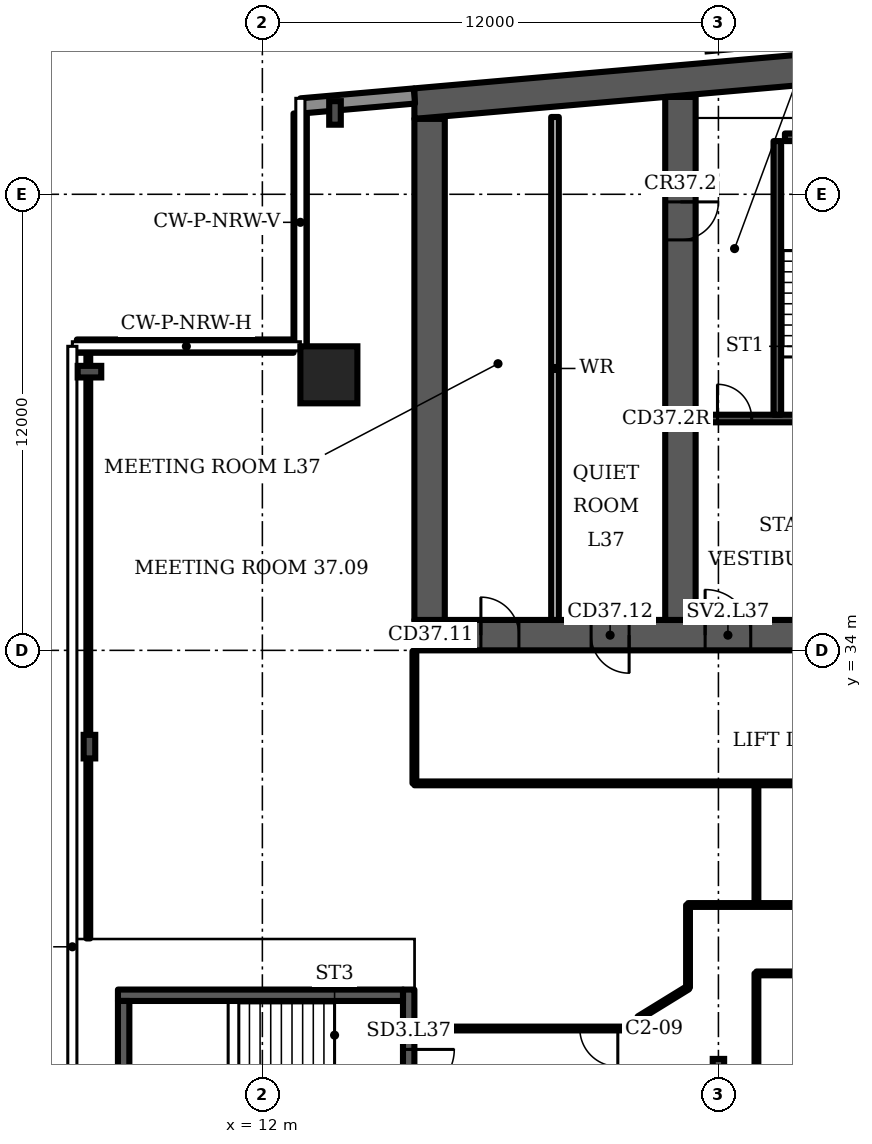
"""IFC4 building model, lengths in metres.
Left out: names, types, materials, properties, quantities, classifications, styles, units other than length and angle.
Written with IfcOpenShell. Run it as: python <this file> out.ifc"""

import sys

from ifc_helpers import new_model, si_unit, direction, frame, frame_2d, origin, origin_2d, place, context, subcontext, project, spatial, polyline, rectangle, i_section, outline, extrude, element, fill, save


model = new_model("IFC4")
c1 = context("Model", 3, precision=1e-05, world=origin(), true_north=direction((0.0, 1.0)))
c2 = subcontext(c1, "Body", "Model", "MODEL_VIEW")
j1 = project(units=[si_unit("LENGTHUNIT", "METRE"), si_unit("PLANEANGLEUNIT", "RADIAN")], contexts=[c1])
p1 = place(None, origin())
s1 = spatial("IfcSite", under=j1, at=p1, CompositionType="ELEMENT")
p2 = place(p1, origin())
s2 = spatial("IfcBuilding", under=s1, at=p2, CompositionType="ELEMENT")
p3 = place(p2, frame((0.0, 0.0, 155.5)))
s3 = spatial("IfcBuildingStorey", under=s2, at=p3, CompositionType="ELEMENT", Elevation=155.5)
p4 = place(p3, origin())
e1 = element("IfcWall", 1, at=p4, inside=s3, PredefinedType="SHEAR", context=c2, shape_type="SweptSolid", body=[
    extrude(outline(polyline([(16.0, 47.984), (37.0, 49.822), (58.0, 47.984), (58.0, 48.787), (37.0, 50.625), (16.0, 48.787), (16.0, 47.984)])), origin(), (0.0, 0.0, 1.0), 3.6),
])
p5 = place(p3, frame((16.0, 34.4, 0.0), z_axis=(0.0, 0.0, 1.0), x_axis=(1.0, 0.0, 0.0)))
e2 = element("IfcWall", 2, at=p5, inside=s3, PredefinedType="SHEAR", context=c2, shape_type="SweptSolid", body=[
    extrude(rectangle(XDim=42.0, YDim=0.8, at=frame_2d((21.0, 0.0))), origin(), (0.0, 0.0, 1.0), 3.6),
])
p6 = place(p5, frame((1.75, 0.0, 0.0)))
e3 = element("IfcOpeningElement", 3, at=p6, cuts=e2, PredefinedType="OPENING", context=c2, shape_type="SweptSolid", body=[
    extrude(rectangle(XDim=1.0, YDim=2.1, at=frame_2d((0.5, 1.05))), frame((0.0, 0.41, 0.0), z_axis=(0.0, -1.0, 0.0), x_axis=(1.0, 0.0, 0.0)), (0.0, 0.0, 1.0), 0.82),
])
p7 = place(p5, frame((4.65, 0.0, 0.0)))
e4 = element("IfcOpeningElement", 4, at=p7, cuts=e2, PredefinedType="OPENING", context=c2, shape_type="SweptSolid", body=[
    extrude(rectangle(XDim=1.0, YDim=2.1, at=frame_2d((0.5, 1.05))), frame((0.0, 0.41, 0.0), z_axis=(0.0, -1.0, 0.0), x_axis=(1.0, 0.0, 0.0)), (0.0, 0.0, 1.0), 0.82),
])
p8 = place(p5, frame((7.65, 0.0, 0.0)))
e5 = element("IfcOpeningElement", 5, at=p8, cuts=e2, PredefinedType="OPENING", context=c2, shape_type="SweptSolid", body=[
    extrude(rectangle(XDim=1.2, YDim=2.1, at=frame_2d((0.6, 1.05))), frame((0.0, 0.41, 0.0), z_axis=(0.0, -1.0, 0.0), x_axis=(1.0, 0.0, 0.0)), (0.0, 0.0, 1.0), 0.82),
])
p9 = place(p5, frame((14.767, 0.0, 0.0)))
e6 = element("IfcOpeningElement", 6, at=p9, cuts=e2, PredefinedType="OPENING", context=c2, shape_type="SweptSolid", body=[
    extrude(rectangle(XDim=1.1, YDim=2.1, at=frame_2d((0.55, 1.05))), frame((0.0, 0.41, 0.0), z_axis=(0.0, -1.0, 0.0), x_axis=(1.0, 0.0, 0.0)), (0.0, 0.0, 1.0), 0.82),
])
p10 = place(p5, frame((19.133, 0.0, 0.0)))
e7 = element("IfcOpeningElement", 7, at=p10, cuts=e2, PredefinedType="OPENING", context=c2, shape_type="SweptSolid", body=[
    extrude(rectangle(XDim=1.1, YDim=2.1, at=frame_2d((0.55, 1.05))), frame((0.0, 0.41, 0.0), z_axis=(0.0, -1.0, 0.0), x_axis=(1.0, 0.0, 0.0)), (0.0, 0.0, 1.0), 0.82),
])
p11 = place(p5, frame((16.8, 0.0, 0.0)))
e8 = element("IfcOpeningElement", 8, at=p11, cuts=e2, PredefinedType="OPENING", context=c2, shape_type="SweptSolid", body=[
    extrude(rectangle(XDim=1.4, YDim=2.1, at=frame_2d((0.7, 1.05))), frame((0.0, 0.41, 0.0), z_axis=(0.0, -1.0, 0.0), x_axis=(1.0, 0.0, 0.0)), (0.0, 0.0, 1.0), 0.82),
])
p12 = place(p5, frame((21.767, 0.0, 0.0)))
e9 = element("IfcOpeningElement", 9, at=p12, cuts=e2, PredefinedType="OPENING", context=c2, shape_type="SweptSolid", body=[
    extrude(rectangle(XDim=1.1, YDim=2.1, at=frame_2d((0.55, 1.05))), frame((0.0, 0.41, 0.0), z_axis=(0.0, -1.0, 0.0), x_axis=(1.0, 0.0, 0.0)), (0.0, 0.0, 1.0), 0.82),
])
p13 = place(p5, frame((23.95, 0.0, 0.0)))
e10 = element("IfcOpeningElement", 10, at=p13, cuts=e2, PredefinedType="OPENING", context=c2, shape_type="SweptSolid", body=[
    extrude(rectangle(XDim=1.1, YDim=2.1, at=frame_2d((0.55, 1.05))), frame((0.0, 0.41, 0.0), z_axis=(0.0, -1.0, 0.0), x_axis=(1.0, 0.0, 0.0)), (0.0, 0.0, 1.0), 0.82),
])
p14 = place(p5, frame((26.133, 0.0, 0.0)))
e11 = element("IfcOpeningElement", 11, at=p14, cuts=e2, PredefinedType="OPENING", context=c2, shape_type="SweptSolid", body=[
    extrude(rectangle(XDim=1.1, YDim=2.1, at=frame_2d((0.55, 1.05))), frame((0.0, 0.41, 0.0), z_axis=(0.0, -1.0, 0.0), x_axis=(1.0, 0.0, 0.0)), (0.0, 0.0, 1.0), 0.82),
])
p15 = place(p5, frame((33.15, 0.0, 0.0)))
e12 = element("IfcOpeningElement", 12, at=p15, cuts=e2, PredefinedType="OPENING", context=c2, shape_type="SweptSolid", body=[
    extrude(rectangle(XDim=1.2, YDim=2.1, at=frame_2d((0.6, 1.05))), frame((0.0, 0.41, 0.0), z_axis=(0.0, -1.0, 0.0), x_axis=(1.0, 0.0, 0.0)), (0.0, 0.0, 1.0), 0.82),
])
p16 = place(p5, frame((35.817, 0.0, 0.0)))
e13 = element("IfcOpeningElement", 13, at=p16, cuts=e2, PredefinedType="OPENING", context=c2, shape_type="SweptSolid", body=[
    extrude(rectangle(XDim=1.0, YDim=2.1, at=frame_2d((0.5, 1.05))), frame((0.0, 0.41, 0.0), z_axis=(0.0, -1.0, 0.0), x_axis=(1.0, 0.0, 0.0)), (0.0, 0.0, 1.0), 0.82),
])
p17 = place(p5, frame((39.95, 0.0, 0.0)))
e14 = element("IfcOpeningElement", 14, at=p17, cuts=e2, PredefinedType="OPENING", context=c2, shape_type="SweptSolid", body=[
    extrude(rectangle(XDim=1.0, YDim=2.1, at=frame_2d((0.5, 1.05))), frame((0.0, 0.41, 0.0), z_axis=(0.0, -1.0, 0.0), x_axis=(1.0, 0.0, 0.0)), (0.0, 0.0, 1.0), 0.82),
])
p18 = place(p5, frame((37.767, 0.0, 0.0)))
e15 = element("IfcOpeningElement", 15, at=p18, cuts=e2, PredefinedType="OPENING", context=c2, shape_type="SweptSolid", body=[
    extrude(rectangle(XDim=1.4, YDim=2.1, at=frame_2d((0.7, 1.05))), frame((0.0, 0.41, 0.0), z_axis=(0.0, -1.0, 0.0), x_axis=(1.0, 0.0, 0.0)), (0.0, 0.0, 1.0), 0.82),
])
p19 = place(p3, frame((16.4, 34.8, 0.0), z_axis=(0.0, 0.0, 1.0), x_axis=(0.0, 1.0, 0.0)))
e16 = element("IfcWall", 16, at=p19, inside=s3, PredefinedType="SHEAR", context=c2, shape_type="SweptSolid", body=[
    extrude(rectangle(XDim=13.184, YDim=0.8, at=frame_2d((6.592, 0.0))), origin(), (0.0, 0.0, 1.0), 3.6),
])
p20 = place(p3, frame((23.0, 34.8, 0.0), z_axis=(0.0, 0.0, 1.0), x_axis=(0.0, 1.0, 0.0)))
e17 = element("IfcWall", 17, at=p20, inside=s3, PredefinedType="SHEAR", context=c2, shape_type="SweptSolid", body=[
    extrude(rectangle(XDim=13.762, YDim=0.8, at=frame_2d((6.881, 0.0))), origin(), (0.0, 0.0, 1.0), 3.6),
])
p21 = place(p20, frame((10.0, 0.0, 0.0)))
e18 = element("IfcOpeningElement", 18, at=p21, cuts=e17, PredefinedType="OPENING", context=c2, shape_type="SweptSolid", body=[
    extrude(rectangle(XDim=1.0, YDim=2.1, at=frame_2d((0.5, 1.05))), frame((0.0, 0.41, 0.0), z_axis=(0.0, -1.0, 0.0), x_axis=(1.0, 0.0, 0.0)), (0.0, 0.0, 1.0), 0.82),
])
p22 = place(p3, frame((13.75, 41.25, 0.0), z_axis=(0.0, 0.0, 1.0), x_axis=(1.0, 0.0, 0.0)))
e19 = element("IfcColumn", 19, at=p22, inside=s3, PredefinedType="COLUMN", context=c2, shape_type="SweptSolid", body=[
    extrude(rectangle(XDim=1.5, YDim=1.5, at=origin_2d()), origin(), (0.0, 0.0, 1.0), 3.6),
])
for number, where, z_axis, x_axis in (
    (20, (13.911, 48.141, 0.0), (0.0, 0.0, 1.0), (-1.0, 0.0, 0.0)),
    (21, (7.45, 41.333, 0.0), (0.0, 0.0, 1.0), (0.0, 1.0, 0.0)),
    (22, (7.45, 31.467, 0.0), (0.0, 0.0, 1.0), (-1.0, 0.0, 0.0)),
):
    element("IfcColumn", number, at=place(p3, frame(where, z_axis=z_axis, x_axis=x_axis)), inside=s3, PredefinedType="COLUMN", context=c2, shape_type="SweptSolid", body=[
        extrude(i_section(OverallWidth=0.305, OverallDepth=0.62, WebThickness=0.021, FlangeThickness=0.04, FilletRadius=0.027, at=origin_2d()), origin(), (0.0, 0.0, 1.0), 3.6),
    ])
p23 = place(p3, frame((24.0, 23.0, 0.0), z_axis=(0.0, 0.0, 1.0), x_axis=(1.0, 0.0, 0.0)))
e23 = element("IfcColumn", 23, at=p23, inside=s3, PredefinedType="COLUMN", context=c2, shape_type="SweptSolid", body=[
    extrude(i_section(OverallWidth=0.3, OverallDepth=0.5, WebThickness=0.014, FlangeThickness=0.028, FilletRadius=0.027, at=origin_2d()), origin(), (0.0, 0.0, 1.0), 3.6),
])
p24 = place(p3, frame((16.0, 48.587, 0.0), z_axis=(0.0, 0.0, 1.0), x_axis=(-0.996194, -0.087168, 0.0)))
e24 = element("IfcWall", 24, at=p24, inside=s3, PredefinedType="SOLIDWALL", context=c2, shape_type="SweptSolid", body=[
    extrude(rectangle(XDim=2.994, YDim=0.4, at=frame_2d((1.497, 0.0))), origin(), (0.0, 0.0, 1.0), 3.2),
])
p25 = place(p3, frame((12.995, 48.126, 0.0), z_axis=(0.0, 0.0, 1.0), x_axis=(0.0, -1.0, 0.0)))
e25 = element("IfcWall", 25, at=p25, inside=s3, PredefinedType="SOLIDWALL", context=c2, shape_type="SweptSolid", body=[
    extrude(rectangle(XDim=6.126, YDim=0.35, at=frame_2d((3.063, 0.0))), origin(), (0.0, 0.0, 1.0), 1.0),
])
p26 = place(p3, frame((12.82, 42.005, 0.0), z_axis=(0.0, 0.0, 1.0), x_axis=(-1.0, 0.0, 0.0)))
e26 = element("IfcWall", 26, at=p26, inside=s3, PredefinedType="SOLIDWALL", context=c2, shape_type="SweptSolid", body=[
    extrude(rectangle(XDim=5.7, YDim=0.35, at=frame_2d((2.85, 0.0))), origin(), (0.0, 0.0, 1.0), 1.0),
])
p27 = place(p3, frame((19.7, 34.8, 0.0), z_axis=(0.0, 0.0, 1.0), x_axis=(0.0, 1.0, 0.0)))
e27 = element("IfcWall", 27, at=p27, inside=s3, PredefinedType="PARTITIONING", context=c2, shape_type="SweptSolid", body=[
    extrude(rectangle(XDim=13.234, YDim=0.2, at=frame_2d((6.617, 0.0))), origin(), (0.0, 0.0, 1.0), 3.2),
])
p28 = place(p3, frame((23.4, 40.1, 0.0), z_axis=(0.0, 0.0, 1.0), x_axis=(1.0, 0.0, 0.0)))
e28 = element("IfcWall", 28, at=p28, inside=s3, PredefinedType="SHEAR", context=c2, shape_type="SweptSolid", body=[
    extrude(rectangle(XDim=6.2, YDim=0.2, at=frame_2d((3.1, 0.0))), origin(), (0.0, 0.0, 1.0), 3.2),
])
p29 = place(p28, frame((3.525, 0.0, 0.0)))
e29 = element("IfcOpeningElement", 29, at=p29, cuts=e28, PredefinedType="OPENING", context=c2, shape_type="SweptSolid", body=[
    extrude(rectangle(XDim=1.2, YDim=2.1, at=frame_2d((0.6, 1.05))), frame((0.0, 0.11, 0.0), z_axis=(0.0, -1.0, 0.0), x_axis=(1.0, 0.0, 0.0)), (0.0, 0.0, 1.0), 0.22),
])
p30 = place(p28, frame((0.575, 0.0, 0.0)))
e30 = element("IfcOpeningElement", 30, at=p30, cuts=e28, PredefinedType="OPENING", context=c2, shape_type="SweptSolid", body=[
    extrude(rectangle(XDim=0.9, YDim=2.1, at=frame_2d((0.45, 1.05))), frame((0.0, 0.11, 0.0), z_axis=(0.0, -1.0, 0.0), x_axis=(1.0, 0.0, 0.0)), (0.0, 0.0, 1.0), 0.22),
])
p31 = place(p3, frame((25.55, 40.2, 0.0), z_axis=(0.0, 0.0, 1.0), x_axis=(0.0, 1.0, 0.0)))
e31 = element("IfcWall", 31, at=p31, inside=s3, PredefinedType="SHEAR", context=c2, shape_type="SweptSolid", body=[
    extrude(rectangle(XDim=7.2, YDim=0.2, at=frame_2d((3.6, 0.0))), origin(), (0.0, 0.0, 1.0), 3.2),
])
p32 = place(p3, frame((25.75, 47.5, 0.0), z_axis=(0.0, 0.0, 1.0), x_axis=(1.0, 0.0, 0.0)))
e32 = element("IfcWall", 32, at=p32, inside=s3, PredefinedType="SHEAR", context=c2, shape_type="SweptSolid", body=[
    extrude(rectangle(XDim=3.85, YDim=0.2, at=frame_2d((1.925, 0.0))), origin(), (0.0, 0.0, 1.0), 3.2),
])
p33 = place(p3, frame((15.85, 20.725, 0.0), z_axis=(0.0, 0.0, 1.0), x_axis=(0.0, 1.0, 0.0)))
e33 = element("IfcWall", 33, at=p33, inside=s3, PredefinedType="SHEAR", context=c2, shape_type="SweptSolid", body=[
    extrude(rectangle(XDim=4.35, YDim=0.3, at=frame_2d((2.175, 0.0))), origin(), (0.0, 0.0, 1.0), 3.2),
])
p34 = place(p33, frame((1.575, 0.0, 0.0)))
e34 = element("IfcOpeningElement", 34, at=p34, cuts=e33, PredefinedType="OPENING", context=c2, shape_type="SweptSolid", body=[
    extrude(rectangle(XDim=1.2, YDim=2.1, at=frame_2d((0.6, 1.05))), frame((0.0, 0.16, 0.0), z_axis=(0.0, -1.0, 0.0), x_axis=(1.0, 0.0, 0.0)), (0.0, 0.0, 1.0), 0.32),
])
p35 = place(p3, frame((7.42, 26.42, 0.0), z_axis=(0.0, 0.0, 1.0), x_axis=(0.0, 1.0, 0.0)))
e35 = element("IfcWall", 35, at=p35, inside=s3, PredefinedType="PARTITIONING", context=c2, shape_type="SweptSolid", body=[
    extrude(rectangle(XDim=15.56, YDim=0.1, at=frame_2d((7.78, 0.0))), origin(), (0.0, 0.0, 1.0), 2.58),
])
p36 = place(p3, frame((16.0, 30.5, 0.0), z_axis=(0.0, 0.0, 1.0), x_axis=(0.0, 1.0, 0.0)))
e36 = element("IfcWall", 36, at=p36, inside=s3, PredefinedType="PARTITIONING", context=c2, shape_type="SweptSolid", body=[
    extrude(rectangle(XDim=3.48, YDim=0.1, at=frame_2d((1.74, 0.0))), origin(), (0.0, 0.0, 1.0), 3.2),
])
p37 = place(p3, frame((16.0, 30.5, 0.0), z_axis=(0.0, 0.0, 1.0), x_axis=(1.0, 0.0, 0.0)))
e37 = element("IfcWall", 37, at=p37, inside=s3, PredefinedType="PARTITIONING", context=c2, shape_type="SweptSolid", body=[
    extrude(rectangle(XDim=20.85, YDim=0.1, at=frame_2d((10.425, 0.0))), origin(), (0.0, 0.0, 1.0), 3.2),
])
p38 = place(p37, frame((14.42, 0.0, 0.0)))
e38 = element("IfcOpeningElement", 38, at=p38, cuts=e37, PredefinedType="OPENING", context=c2, shape_type="SweptSolid", body=[
    extrude(rectangle(XDim=1.0, YDim=2.1, at=frame_2d((0.5, 1.05))), frame((0.0, 0.06, 0.0), z_axis=(0.0, -1.0, 0.0), x_axis=(1.0, 0.0, 0.0)), (0.0, 0.0, 1.0), 0.12),
])
p39 = place(p3, frame((16.02, 24.05, 0.0), z_axis=(0.0, 0.0, 1.0), x_axis=(1.0, 0.0, 0.0)))
e39 = element("IfcWall", 39, at=p39, inside=s3, PredefinedType="PARTITIONING", context=c2, shape_type="SweptSolid", body=[
    extrude(rectangle(XDim=5.855, YDim=0.1, at=frame_2d((2.927, 0.0))), origin(), (0.0, 0.0, 1.0), 3.2),
])
p40 = place(p39, frame((4.333, 0.0, 0.0)))
e40 = element("IfcOpeningElement", 40, at=p40, cuts=e39, PredefinedType="OPENING", context=c2, shape_type="SweptSolid", body=[
    extrude(rectangle(XDim=1.0, YDim=2.1, at=frame_2d((0.5, 1.05))), frame((0.0, 0.06, 0.0), z_axis=(0.0, -1.0, 0.0), x_axis=(1.0, 0.0, 0.0)), (0.0, 0.0, 1.0), 0.12),
])
p41 = place(p3, frame((21.9, 24.325, 0.0), z_axis=(0.0, 0.0, 1.0), x_axis=(0.851649, 0.524104, 0.0)))
e41 = element("IfcWall", 41, at=p41, inside=s3, PredefinedType="PARTITIONING", context=c2, shape_type="SweptSolid", body=[
    extrude(rectangle(XDim=1.527, YDim=0.1, at=frame_2d((0.763, 0.0))), origin(), (0.0, 0.0, 1.0), 3.2),
])
p42 = place(p3, frame((23.2, 25.125, 0.0), z_axis=(0.0, 0.0, 1.0), x_axis=(0.0, 1.0, 0.0)))
e42 = element("IfcWall", 42, at=p42, inside=s3, PredefinedType="PARTITIONING", context=c2, shape_type="SweptSolid", body=[
    extrude(rectangle(XDim=2.175, YDim=0.1, at=frame_2d((1.087, 0.0))), origin(), (0.0, 0.0, 1.0), 3.2),
])
p43 = place(p3, frame((23.2, 27.3, 0.0), z_axis=(0.0, 0.0, 1.0), x_axis=(1.0, 0.0, 0.0)))
e43 = element("IfcWall", 43, at=p43, inside=s3, PredefinedType="PARTITIONING", context=c2, shape_type="SweptSolid", body=[
    extrude(rectangle(XDim=33.9, YDim=0.1, at=frame_2d((16.95, 0.0))), origin(), (0.0, 0.0, 1.0), 3.2),
])
p44 = place(p43, frame((16.3, 0.0, 0.0)))
e44 = element("IfcOpeningElement", 44, at=p44, cuts=e43, PredefinedType="OPENING", context=c2, shape_type="SweptSolid", body=[
    extrude(rectangle(XDim=1.0, YDim=2.1, at=frame_2d((0.5, 1.05))), frame((0.0, 0.06, 0.0), z_axis=(0.0, -1.0, 0.0), x_axis=(1.0, 0.0, 0.0)), (0.0, 0.0, 1.0), 0.12),
])
p45 = place(p43, frame((20.72, 0.0, 0.0)))
e45 = element("IfcOpeningElement", 45, at=p45, cuts=e43, PredefinedType="OPENING", context=c2, shape_type="SweptSolid", body=[
    extrude(rectangle(XDim=1.0, YDim=2.1, at=frame_2d((0.5, 1.05))), frame((0.0, 0.06, 0.0), z_axis=(0.0, -1.0, 0.0), x_axis=(1.0, 0.0, 0.0)), (0.0, 0.0, 1.0), 0.12),
])
p46 = place(p43, frame((23.54, 0.0, 0.0)))
e46 = element("IfcOpeningElement", 46, at=p46, cuts=e43, PredefinedType="OPENING", context=c2, shape_type="SweptSolid", body=[
    extrude(rectangle(XDim=1.0, YDim=2.1, at=frame_2d((0.5, 1.05))), frame((0.0, 0.06, 0.0), z_axis=(0.0, -1.0, 0.0), x_axis=(1.0, 0.0, 0.0)), (0.0, 0.0, 1.0), 0.12),
])
p47 = place(p43, frame((26.36, 0.0, 0.0)))
e47 = element("IfcOpeningElement", 47, at=p47, cuts=e43, PredefinedType="OPENING", context=c2, shape_type="SweptSolid", body=[
    extrude(rectangle(XDim=1.0, YDim=2.1, at=frame_2d((0.5, 1.05))), frame((0.0, 0.06, 0.0), z_axis=(0.0, -1.0, 0.0), x_axis=(1.0, 0.0, 0.0)), (0.0, 0.0, 1.0), 0.12),
])
p48 = place(p43, frame((29.18, 0.0, 0.0)))
e48 = element("IfcOpeningElement", 48, at=p48, cuts=e43, PredefinedType="OPENING", context=c2, shape_type="SweptSolid", body=[
    extrude(rectangle(XDim=1.0, YDim=2.1, at=frame_2d((0.5, 1.05))), frame((0.0, 0.06, 0.0), z_axis=(0.0, -1.0, 0.0), x_axis=(1.0, 0.0, 0.0)), (0.0, 0.0, 1.0), 0.12),
])
p49 = place(p43, frame((32.0, 0.0, 0.0)))
e49 = element("IfcOpeningElement", 49, at=p49, cuts=e43, PredefinedType="OPENING", context=c2, shape_type="SweptSolid", body=[
    extrude(rectangle(XDim=1.0, YDim=2.1, at=frame_2d((0.5, 1.05))), frame((0.0, 0.06, 0.0), z_axis=(0.0, -1.0, 0.0), x_axis=(1.0, 0.0, 0.0)), (0.0, 0.0, 1.0), 0.12),
])
p50 = place(p3, frame((25.0, 27.3, 0.0), z_axis=(0.0, 0.0, 1.0), x_axis=(0.0, 1.0, 0.0)))
e50 = element("IfcWall", 50, at=p50, inside=s3, PredefinedType="PARTITIONING", context=c2, shape_type="SweptSolid", body=[
    extrude(rectangle(XDim=3.2, YDim=0.1, at=frame_2d((1.6, 0.0))), origin(), (0.0, 0.0, 1.0), 3.2),
])
p51 = place(p3, frame((25.0, 13.675, 0.0), z_axis=(0.0, 0.0, 1.0), x_axis=(0.0, 1.0, 0.0)))
e51 = element("IfcWall", 51, at=p51, inside=s3, PredefinedType="PARTITIONING", context=c2, shape_type="SweptSolid", body=[
    extrude(rectangle(XDim=11.825, YDim=0.1, at=frame_2d((5.913, 0.0))), origin(), (0.0, 0.0, 1.0), 3.2),
])
p52 = place(p3, frame((25.0, 25.5, 0.0), z_axis=(0.0, 0.0, 1.0), x_axis=(1.0, 0.0, 0.0)))
e52 = element("IfcWall", 52, at=p52, inside=s3, PredefinedType="PARTITIONING", context=c2, shape_type="SweptSolid", body=[
    extrude(rectangle(XDim=36.705, YDim=0.1, at=frame_2d((18.353, 0.0))), origin(), (0.0, 0.0, 1.0), 3.2),
])
p53 = place(p52, frame((5.02, 0.0, 0.0)))
e53 = element("IfcOpeningElement", 53, at=p53, cuts=e52, PredefinedType="OPENING", context=c2, shape_type="SweptSolid", body=[
    extrude(rectangle(XDim=1.8, YDim=2.1, at=frame_2d((0.9, 1.05))), frame((0.0, 0.06, 0.0), z_axis=(0.0, -1.0, 0.0), x_axis=(1.0, 0.0, 0.0)), (0.0, 0.0, 1.0), 0.12),
])
p54 = place(p3, frame((8.2, 24.925, 0.0), z_axis=(0.0, 0.0, 1.0), x_axis=(1.0, 0.0, 0.0)))
e54 = element("IfcWall", 54, at=p54, inside=s3, PredefinedType="SHEAR", context=c2, shape_type="SweptSolid", body=[
    extrude(rectangle(XDim=7.5, YDim=0.3, at=frame_2d((3.75, 0.0))), origin(), (0.0, 0.0, 1.0), 3.2),
])
p55 = place(p3, frame((8.35, 21.025, 0.0), z_axis=(0.0, 0.0, 1.0), x_axis=(0.0, 1.0, 0.0)))
e55 = element("IfcWall", 55, at=p55, inside=s3, PredefinedType="SHEAR", context=c2, shape_type="SweptSolid", body=[
    extrude(rectangle(XDim=3.75, YDim=0.3, at=frame_2d((1.875, 0.0))), origin(), (0.0, 0.0, 1.0), 3.2),
])
p56 = place(p6, origin())
e56 = element("IfcDoor", 56, at=p56, inside=s3, OperationType="SINGLE_SWING_LEFT", PredefinedType="DOOR", context=c2, shape_type="SweptSolid", body=[
    extrude(rectangle(XDim=1.0, YDim=2.1, at=frame_2d((0.5, 1.05))), frame((0.0, 0.4, 0.0), z_axis=(0.0, -1.0, 0.0), x_axis=(1.0, 0.0, 0.0)), (0.0, 0.0, 1.0), 0.8),
])
fill(e3, e56)
p57 = place(p7, origin())
e57 = element("IfcDoor", 57, at=p57, inside=s3, OperationType="SINGLE_SWING_RIGHT", PredefinedType="DOOR", context=c2, shape_type="SweptSolid", body=[
    extrude(rectangle(XDim=1.0, YDim=2.1, at=frame_2d((0.5, 1.05))), frame((0.0, 0.4, 0.0), z_axis=(0.0, -1.0, 0.0), x_axis=(1.0, 0.0, 0.0)), (0.0, 0.0, 1.0), 0.8),
])
fill(e4, e57)
p58 = place(p30, origin())
e58 = element("IfcDoor", 58, at=p58, inside=s3, OperationType="SINGLE_SWING_LEFT", PredefinedType="DOOR", context=c2, shape_type="SweptSolid", body=[
    extrude(rectangle(XDim=0.9, YDim=2.1, at=frame_2d((0.45, 1.05))), frame((0.0, 0.025, 0.0), z_axis=(0.0, -1.0, 0.0), x_axis=(1.0, 0.0, 0.0)), (0.0, 0.0, 1.0), 0.05),
])
fill(e30, e58)
p59 = place(p8, origin())
e59 = element("IfcDoor", 59, at=p59, inside=s3, OperationType="SINGLE_SWING_LEFT", PredefinedType="DOOR", context=c2, shape_type="SweptSolid", body=[
    extrude(rectangle(XDim=1.2, YDim=2.1, at=frame_2d((0.6, 1.05))), frame((0.0, 0.025, 0.0), z_axis=(0.0, -1.0, 0.0), x_axis=(1.0, 0.0, 0.0)), (0.0, 0.0, 1.0), 0.05),
])
fill(e5, e59)
p60 = place(p21, origin())
e60 = element("IfcDoor", 60, at=p60, inside=s3, OperationType="SINGLE_SWING_RIGHT", PredefinedType="DOOR", context=c2, shape_type="SweptSolid", body=[
    extrude(rectangle(XDim=1.0, YDim=2.1, at=frame_2d((0.5, 1.05))), frame((0.0, 0.4, 0.0), z_axis=(0.0, -1.0, 0.0), x_axis=(1.0, 0.0, 0.0)), (0.0, 0.0, 1.0), 0.8),
])
fill(e18, e60)
p61 = place(p34, origin())
e61 = element("IfcDoor", 61, at=p61, inside=s3, OperationType="SINGLE_SWING_RIGHT", PredefinedType="DOOR", context=c2, shape_type="SweptSolid", body=[
    extrude(rectangle(XDim=1.2, YDim=2.1, at=frame_2d((0.6, 1.05))), frame((0.0, 0.025, 0.0), z_axis=(0.0, -1.0, 0.0), x_axis=(1.0, 0.0, 0.0)), (0.0, 0.0, 1.0), 0.05),
])
fill(e34, e61)
p62 = place(p40, origin())
e62 = element("IfcDoor", 62, at=p62, inside=s3, OperationType="SINGLE_SWING_RIGHT", PredefinedType="DOOR", context=c2, shape_type="SweptSolid", body=[
    extrude(rectangle(XDim=1.0, YDim=2.1, at=frame_2d((0.5, 1.05))), frame((0.0, 0.025, 0.0), z_axis=(0.0, -1.0, 0.0), x_axis=(1.0, 0.0, 0.0)), (0.0, 0.0, 1.0), 0.05),
])
fill(e40, e62)
save(model, sys.argv[1])
